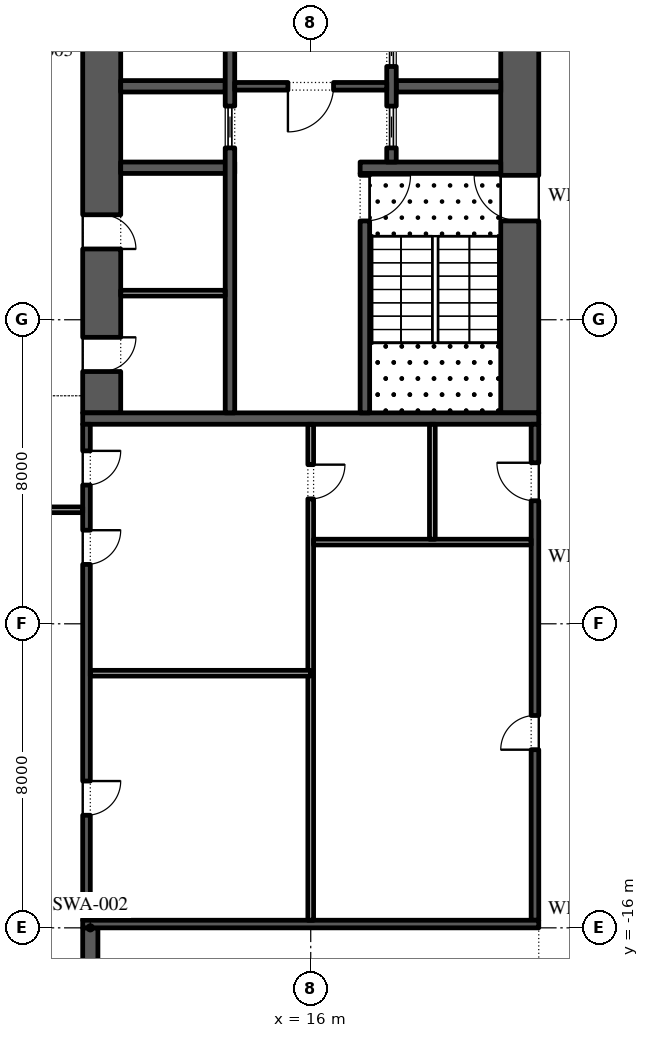
"""IFC4 building model, lengths in metres.
Left out: names, types, materials, properties, quantities, classifications, styles, units other than length and angle.
Written with IfcOpenShell. Run it as: python <this file> out.ifc"""

import sys

from ifc_helpers import new_model, si_unit, direction, frame, frame_2d, origin, place, context, subcontext, project, spatial, rectangle, extrude, element, fill, save


model = new_model("IFC4")
c1 = context("Model", 3, precision=1e-05, world=origin(), true_north=direction((0.0, 1.0)))
c2 = subcontext(c1, "Body", "Model", "MODEL_VIEW")
j1 = project(units=[si_unit("LENGTHUNIT", "METRE"), si_unit("PLANEANGLEUNIT", "RADIAN")], contexts=[c1])
p1 = place(None, origin())
s1 = spatial("IfcSite", under=j1, at=p1, CompositionType="ELEMENT")
p2 = place(p1, origin())
s2 = spatial("IfcBuilding", under=s1, at=p2, CompositionType="ELEMENT")
p3 = place(p2, frame((0.0, 0.0, 14.0)))
s3 = spatial("IfcBuildingStorey", under=s2, at=p3, CompositionType="ELEMENT", Elevation=14.0)
p4 = place(p3, frame((10.2, -31.0, 0.0), z_axis=(0.0, 0.0, 1.0), x_axis=(0.0, 1.0, 0.0)))
e1 = element("IfcWall", 1, at=p4, inside=s3, PredefinedType="SHEAR", context=c2, shape_type="SweptSolid", body=[
    extrude(rectangle(XDim=15.0, YDim=0.4, at=frame_2d((7.5, 0.0))), origin(), (0.0, 0.0, 1.0), 4.9),
])
p5 = place(p3, frame((21.5, -2.45, 0.0), z_axis=(0.0, 0.0, 1.0), x_axis=(0.0, 1.0, 0.0)))
e2 = element("IfcWall", 2, at=p5, inside=s3, PredefinedType="SHEAR", context=c2, shape_type="SweptSolid", body=[
    extrude(rectangle(XDim=27.9, YDim=1.0, at=frame_2d((13.95, 0.0))), origin(), (0.0, 0.0, 1.0), 4.9),
])
p6 = place(p5, frame((5.05, 0.0, 0.0)))
e3 = element("IfcOpeningElement", 3, at=p6, cuts=e2, PredefinedType="OPENING", context=c2, shape_type="SweptSolid", body=[
    extrude(rectangle(XDim=1.2, YDim=2.1, at=frame_2d((0.6, 1.05))), frame((0.0, 0.51, 0.0), z_axis=(0.0, -1.0, 0.0), x_axis=(1.0, 0.0, 0.0)), (0.0, 0.0, 1.0), 1.02),
])
p7 = place(p5, frame((21.65, 0.0, 0.0)))
e4 = element("IfcOpeningElement", 4, at=p7, cuts=e2, PredefinedType="OPENING", context=c2, shape_type="SweptSolid", body=[
    extrude(rectangle(XDim=1.2, YDim=2.1, at=frame_2d((0.6, 1.05))), frame((0.0, 0.51, 0.0), z_axis=(0.0, -1.0, 0.0), x_axis=(1.0, 0.0, 0.0)), (0.0, 0.0, 1.0), 1.02),
])
p8 = place(p3, frame((10.5, -2.45, 0.0), z_axis=(0.0, 0.0, 1.0), x_axis=(0.0, 1.0, 0.0)))
e5 = element("IfcWall", 5, at=p8, inside=s3, PredefinedType="SHEAR", context=c2, shape_type="SweptSolid", body=[
    extrude(rectangle(XDim=27.9, YDim=1.0, at=frame_2d((13.95, 0.0))), origin(), (0.0, 0.0, 1.0), 4.9),
])
p9 = place(p8, frame((23.65, 0.0, 0.0)))
e6 = element("IfcOpeningElement", 6, at=p9, cuts=e5, PredefinedType="OPENING", context=c2, shape_type="SweptSolid", body=[
    extrude(rectangle(XDim=2.4, YDim=2.1, at=frame_2d((1.2, 1.05))), frame((0.0, 0.51, 0.0), z_axis=(0.0, -1.0, 0.0), x_axis=(1.0, 0.0, 0.0)), (0.0, 0.0, 1.0), 1.02),
])
p10 = place(p8, frame((1.087, 0.0, 0.0)))
e7 = element("IfcOpeningElement", 7, at=p10, cuts=e5, PredefinedType="OPENING", context=c2, shape_type="SweptSolid", body=[
    extrude(rectangle(XDim=0.9, YDim=2.1, at=frame_2d((0.45, 1.05))), frame((0.0, 0.51, 0.0), z_axis=(0.0, -1.0, 0.0), x_axis=(1.0, 0.0, 0.0)), (0.0, 0.0, 1.0), 1.02),
])
p11 = place(p8, frame((4.312, 0.0, 0.0)))
e8 = element("IfcOpeningElement", 8, at=p11, cuts=e5, PredefinedType="OPENING", context=c2, shape_type="SweptSolid", body=[
    extrude(rectangle(XDim=0.9, YDim=2.1, at=frame_2d((0.45, 1.05))), frame((0.0, 0.51, 0.0), z_axis=(0.0, -1.0, 0.0), x_axis=(1.0, 0.0, 0.0)), (0.0, 0.0, 1.0), 1.02),
])
p12 = place(p3, frame((10.0, -2.6, 0.0), z_axis=(0.0, 0.0, 1.0), x_axis=(1.0, 0.0, 0.0)))
e9 = element("IfcWall", 9, at=p12, inside=s3, PredefinedType="SHEAR", context=c2, shape_type="SweptSolid", body=[
    extrude(rectangle(XDim=12.0, YDim=0.3, at=frame_2d((6.0, 0.0))), origin(), (0.0, 0.0, 1.0), 4.9),
])
p13 = place(p3, frame((17.3, 4.0, 0.0), z_axis=(0.0, 0.0, 1.0), x_axis=(1.0, 0.0, 0.0)))
e10 = element("IfcWall", 10, at=p13, inside=s3, PredefinedType="SHEAR", context=c2, shape_type="SweptSolid", body=[
    extrude(rectangle(XDim=3.7, YDim=0.3, at=frame_2d((1.85, 0.0))), origin(), (0.0, 0.0, 1.0), 4.9),
])
p14 = place(p3, frame((17.425, -2.45, 0.0), z_axis=(0.0, 0.0, 1.0), x_axis=(0.0, 1.0, 0.0)))
e11 = element("IfcWall", 11, at=p14, inside=s3, PredefinedType="SHEAR", context=c2, shape_type="SweptSolid", body=[
    extrude(rectangle(XDim=6.3, YDim=0.25, at=frame_2d((3.15, 0.0))), origin(), (0.0, 0.0, 1.0), 4.9),
])
p15 = place(p14, frame((5.05, 0.0, 0.0)))
e12 = element("IfcOpeningElement", 12, at=p15, cuts=e11, PredefinedType="OPENING", context=c2, shape_type="SweptSolid", body=[
    extrude(rectangle(XDim=1.2, YDim=2.1, at=frame_2d((0.6, 1.05))), frame((0.0, 0.135, 0.0), z_axis=(0.0, -1.0, 0.0), x_axis=(1.0, 0.0, 0.0)), (0.0, 0.0, 1.0), 0.27),
])
p16 = place(p3, frame((18.25, 6.143, 0.0), z_axis=(0.0, 0.0, 1.0), x_axis=(1.0, 0.0, 0.0)))
e13 = element("IfcWall", 13, at=p16, inside=s3, PredefinedType="SHEAR", context=c2, shape_type="SweptSolid", body=[
    extrude(rectangle(XDim=2.75, YDim=0.3, at=frame_2d((1.375, 0.0))), origin(), (0.0, 0.0, 1.0), 4.9),
])
p17 = place(p3, frame((18.125, 4.15, 0.0), z_axis=(0.0, 0.0, 1.0), x_axis=(0.0, 1.0, 0.0)))
e14 = element("IfcWall", 14, at=p17, inside=s3, PredefinedType="SHEAR", context=c2, shape_type="SweptSolid", body=[
    extrude(rectangle(XDim=14.7, YDim=0.25, at=frame_2d((7.35, 0.0))), origin(), (0.0, 0.0, 1.0), 4.9),
])
p18 = place(p17, frame((0.371, 0.0, 0.0)))
e15 = element("IfcOpeningElement", 15, at=p18, cuts=e14, PredefinedType="OPENING", context=c2, shape_type="SweptSolid", body=[
    extrude(rectangle(XDim=1.1, YDim=2.1, at=frame_2d((0.55, 1.05))), frame((0.0, 0.135, 0.0), z_axis=(0.0, -1.0, 0.0), x_axis=(1.0, 0.0, 0.0)), (0.0, 0.0, 1.0), 0.27),
])
p19 = place(p17, frame((2.514, 0.0, 0.0)))
e16 = element("IfcOpeningElement", 16, at=p19, cuts=e14, PredefinedType="OPENING", context=c2, shape_type="SweptSolid", body=[
    extrude(rectangle(XDim=1.1, YDim=2.1, at=frame_2d((0.55, 1.05))), frame((0.0, 0.135, 0.0), z_axis=(0.0, -1.0, 0.0), x_axis=(1.0, 0.0, 0.0)), (0.0, 0.0, 1.0), 0.27),
])
p20 = place(p17, frame((4.657, 0.0, 0.0)))
e17 = element("IfcOpeningElement", 17, at=p20, cuts=e14, PredefinedType="OPENING", context=c2, shape_type="SweptSolid", body=[
    extrude(rectangle(XDim=1.1, YDim=2.1, at=frame_2d((0.55, 1.05))), frame((0.0, 0.135, 0.0), z_axis=(0.0, -1.0, 0.0), x_axis=(1.0, 0.0, 0.0)), (0.0, 0.0, 1.0), 0.27),
])
p21 = place(p17, frame((6.8, 0.0, 0.0)))
e18 = element("IfcOpeningElement", 18, at=p21, cuts=e14, PredefinedType="OPENING", context=c2, shape_type="SweptSolid", body=[
    extrude(rectangle(XDim=1.1, YDim=2.1, at=frame_2d((0.55, 1.05))), frame((0.0, 0.135, 0.0), z_axis=(0.0, -1.0, 0.0), x_axis=(1.0, 0.0, 0.0)), (0.0, 0.0, 1.0), 0.27),
])
p22 = place(p17, frame((8.943, 0.0, 0.0)))
e19 = element("IfcOpeningElement", 19, at=p22, cuts=e14, PredefinedType="OPENING", context=c2, shape_type="SweptSolid", body=[
    extrude(rectangle(XDim=1.1, YDim=2.1, at=frame_2d((0.55, 1.05))), frame((0.0, 0.135, 0.0), z_axis=(0.0, -1.0, 0.0), x_axis=(1.0, 0.0, 0.0)), (0.0, 0.0, 1.0), 0.27),
])
p23 = place(p17, frame((11.086, 0.0, 0.0)))
e20 = element("IfcOpeningElement", 20, at=p23, cuts=e14, PredefinedType="OPENING", context=c2, shape_type="SweptSolid", body=[
    extrude(rectangle(XDim=1.1, YDim=2.1, at=frame_2d((0.55, 1.05))), frame((0.0, 0.135, 0.0), z_axis=(0.0, -1.0, 0.0), x_axis=(1.0, 0.0, 0.0)), (0.0, 0.0, 1.0), 0.27),
])
p24 = place(p17, frame((13.229, 0.0, 0.0)))
e21 = element("IfcOpeningElement", 21, at=p24, cuts=e14, PredefinedType="OPENING", context=c2, shape_type="SweptSolid", body=[
    extrude(rectangle(XDim=1.1, YDim=2.1, at=frame_2d((0.55, 1.05))), frame((0.0, 0.135, 0.0), z_axis=(0.0, -1.0, 0.0), x_axis=(1.0, 0.0, 0.0)), (0.0, 0.0, 1.0), 0.27),
])
p25 = place(p3, frame((11.0, 4.0, 0.0), z_axis=(0.0, 0.0, 1.0), x_axis=(1.0, 0.0, 0.0)))
e22 = element("IfcWall", 22, at=p25, inside=s3, PredefinedType="SHEAR", context=c2, shape_type="SweptSolid", body=[
    extrude(rectangle(XDim=3.0, YDim=0.3, at=frame_2d((1.5, 0.0))), origin(), (0.0, 0.0, 1.0), 4.9),
])
p26 = place(p3, frame((11.0, 6.143, 0.0), z_axis=(0.0, 0.0, 1.0), x_axis=(1.0, 0.0, 0.0)))
e23 = element("IfcWall", 23, at=p26, inside=s3, PredefinedType="SHEAR", context=c2, shape_type="SweptSolid", body=[
    extrude(rectangle(XDim=2.75, YDim=0.3, at=frame_2d((1.375, 0.0))), origin(), (0.0, 0.0, 1.0), 4.9),
])
p27 = place(p3, frame((13.875, -2.45, 0.0), z_axis=(0.0, 0.0, 1.0), x_axis=(0.0, 1.0, 0.0)))
e24 = element("IfcWall", 24, at=p27, inside=s3, PredefinedType="SHEAR", context=c2, shape_type="SweptSolid", body=[
    extrude(rectangle(XDim=21.3, YDim=0.25, at=frame_2d((10.65, 0.0))), origin(), (0.0, 0.0, 1.0), 4.9),
])
p28 = place(p27, frame((14.571, 0.0, 0.0)))
e25 = element("IfcOpeningElement", 25, at=p28, cuts=e24, PredefinedType="OPENING", context=c2, shape_type="SweptSolid", body=[
    extrude(rectangle(XDim=0.9, YDim=2.1, at=frame_2d((0.45, 1.05))), frame((0.0, 0.135, 0.0), z_axis=(0.0, -1.0, 0.0), x_axis=(1.0, 0.0, 0.0)), (0.0, 0.0, 1.0), 0.27),
])
p29 = place(p27, frame((6.971, 0.0, 0.0)))
e26 = element("IfcOpeningElement", 26, at=p29, cuts=e24, PredefinedType="OPENING", context=c2, shape_type="SweptSolid", body=[
    extrude(rectangle(XDim=1.1, YDim=2.1, at=frame_2d((0.55, 1.05))), frame((0.0, 0.135, 0.0), z_axis=(0.0, -1.0, 0.0), x_axis=(1.0, 0.0, 0.0)), (0.0, 0.0, 1.0), 0.27),
])
p30 = place(p3, frame((14.0, 6.143, 0.0), z_axis=(0.0, 0.0, 1.0), x_axis=(1.0, 0.0, 0.0)))
e27 = element("IfcWall", 27, at=p30, inside=s3, PredefinedType="SHEAR", context=c2, shape_type="SweptSolid", body=[
    extrude(rectangle(XDim=4.0, YDim=0.2, at=frame_2d((2.0, 0.0))), origin(), (0.0, 0.0, 1.0), 4.9),
])
p31 = place(p30, frame((1.4, 0.0, 0.0)))
e28 = element("IfcOpeningElement", 28, at=p31, cuts=e27, PredefinedType="OPENING", context=c2, shape_type="SweptSolid", body=[
    extrude(rectangle(XDim=1.2, YDim=2.1, at=frame_2d((0.6, 1.05))), frame((0.0, 0.11, 0.0), z_axis=(0.0, -1.0, 0.0), x_axis=(1.0, 0.0, 0.0)), (0.0, 0.0, 1.0), 0.22),
])
p32 = place(p3, frame((11.0, 0.7, 0.0), z_axis=(0.0, 0.0, 1.0), x_axis=(1.0, 0.0, 0.0)))
e29 = element("IfcWall", 29, at=p32, inside=s3, PredefinedType="PARTITIONING", context=c2, shape_type="SweptSolid", body=[
    extrude(rectangle(XDim=2.75, YDim=0.15, at=frame_2d((1.375, 0.0))), origin(), (0.0, 0.0, 1.0), 4.9),
])
p33 = place(p3, frame((21.9, -15.8, 0.0), z_axis=(0.0, 0.0, 1.0), x_axis=(0.0, 1.0, 0.0)))
e30 = element("IfcWall", 30, at=p33, inside=s3, PredefinedType="SHEAR", context=c2, shape_type="SweptSolid", body=[
    extrude(rectangle(XDim=13.05, YDim=0.2, at=frame_2d((6.525, 0.0))), origin(), (0.0, 0.0, 1.0), 4.9),
])
p34 = place(p33, frame((4.488, 0.0, 0.0)))
e31 = element("IfcOpeningElement", 31, at=p34, cuts=e30, PredefinedType="OPENING", context=c2, shape_type="SweptSolid", body=[
    extrude(rectangle(XDim=0.9, YDim=2.1, at=frame_2d((0.45, 1.05))), frame((0.0, 0.11, 0.0), z_axis=(0.0, -1.0, 0.0), x_axis=(1.0, 0.0, 0.0)), (0.0, 0.0, 1.0), 0.22),
])
p35 = place(p33, frame((11.038, 0.0, 0.0)))
e32 = element("IfcOpeningElement", 32, at=p35, cuts=e30, PredefinedType="OPENING", context=c2, shape_type="SweptSolid", body=[
    extrude(rectangle(XDim=1.0, YDim=2.1, at=frame_2d((0.5, 1.05))), frame((0.0, 0.11, 0.0), z_axis=(0.0, -1.0, 0.0), x_axis=(1.0, 0.0, 0.0)), (0.0, 0.0, 1.0), 0.22),
])
p36 = place(p3, frame((10.1, -15.8, 0.0), z_axis=(0.0, 0.0, 1.0), x_axis=(0.0, 1.0, 0.0)))
e33 = element("IfcWall", 33, at=p36, inside=s3, PredefinedType="SHEAR", context=c2, shape_type="SweptSolid", body=[
    extrude(rectangle(XDim=13.05, YDim=0.2, at=frame_2d((6.525, 0.0))), origin(), (0.0, 0.0, 1.0), 4.9),
])
p37 = place(p36, frame((2.762, 0.0, 0.0)))
e34 = element("IfcOpeningElement", 34, at=p37, cuts=e33, PredefinedType="OPENING", context=c2, shape_type="SweptSolid", body=[
    extrude(rectangle(XDim=0.9, YDim=2.1, at=frame_2d((0.45, 1.05))), frame((0.0, 0.11, 0.0), z_axis=(0.0, -1.0, 0.0), x_axis=(1.0, 0.0, 0.0)), (0.0, 0.0, 1.0), 0.22),
])
p38 = place(p36, frame((9.363, 0.0, 0.0)))
e35 = element("IfcOpeningElement", 35, at=p38, cuts=e33, PredefinedType="OPENING", context=c2, shape_type="SweptSolid", body=[
    extrude(rectangle(XDim=0.9, YDim=2.1, at=frame_2d((0.45, 1.05))), frame((0.0, 0.11, 0.0), z_axis=(0.0, -1.0, 0.0), x_axis=(1.0, 0.0, 0.0)), (0.0, 0.0, 1.0), 0.22),
])
p39 = place(p36, frame((11.45, 0.0, 0.0)))
e36 = element("IfcOpeningElement", 36, at=p39, cuts=e33, PredefinedType="OPENING", context=c2, shape_type="SweptSolid", body=[
    extrude(rectangle(XDim=0.9, YDim=2.1, at=frame_2d((0.45, 1.05))), frame((0.0, 0.11, 0.0), z_axis=(0.0, -1.0, 0.0), x_axis=(1.0, 0.0, 0.0)), (0.0, 0.0, 1.0), 0.22),
])
p40 = place(p3, frame((10.0, -15.9, 0.0), z_axis=(0.0, 0.0, 1.0), x_axis=(1.0, 0.0, 0.0)))
e37 = element("IfcWall", 37, at=p40, inside=s3, PredefinedType="SHEAR", context=c2, shape_type="SweptSolid", body=[
    extrude(rectangle(XDim=12.0, YDim=0.2, at=frame_2d((6.0, 0.0))), origin(), (0.0, 0.0, 1.0), 4.9),
])
p41 = place(p3, frame((16.0, -15.8, 0.0), z_axis=(0.0, 0.0, 1.0), x_axis=(0.0, 1.0, 0.0)))
e38 = element("IfcWall", 38, at=p41, inside=s3, PredefinedType="PARTITIONING", context=c2, shape_type="SweptSolid", body=[
    extrude(rectangle(XDim=13.05, YDim=0.15, at=frame_2d((6.525, 0.0))), origin(), (0.0, 0.0, 1.0), 4.9),
])
p42 = place(p41, frame((11.087, 0.0, 0.0)))
e39 = element("IfcOpeningElement", 39, at=p42, cuts=e38, PredefinedType="OPENING", context=c2, shape_type="SweptSolid", body=[
    extrude(rectangle(XDim=0.9, YDim=2.1, at=frame_2d((0.45, 1.05))), frame((0.0, 0.085, 0.0), z_axis=(0.0, -1.0, 0.0), x_axis=(1.0, 0.0, 0.0)), (0.0, 0.0, 1.0), 0.17),
])
p43 = place(p3, frame((10.2, -9.3, 0.0), z_axis=(0.0, 0.0, 1.0), x_axis=(1.0, 0.0, 0.0)))
e40 = element("IfcWall", 40, at=p43, inside=s3, PredefinedType="PARTITIONING", context=c2, shape_type="SweptSolid", body=[
    extrude(rectangle(XDim=5.8, YDim=0.15, at=frame_2d((2.9, 0.0))), origin(), (0.0, 0.0, 1.0), 4.9),
])
p44 = place(p3, frame((16.075, -5.85, 0.0), z_axis=(0.0, 0.0, 1.0), x_axis=(1.0, 0.0, 0.0)))
e41 = element("IfcWall", 41, at=p44, inside=s3, PredefinedType="PARTITIONING", context=c2, shape_type="SweptSolid", body=[
    extrude(rectangle(XDim=5.725, YDim=0.15, at=frame_2d((2.863, 0.0))), origin(), (0.0, 0.0, 1.0), 4.9),
])
p45 = place(p3, frame((19.2, -5.775, 0.0), z_axis=(0.0, 0.0, 1.0), x_axis=(0.0, 1.0, 0.0)))
e42 = element("IfcWall", 42, at=p45, inside=s3, PredefinedType="PARTITIONING", context=c2, shape_type="SweptSolid", body=[
    extrude(rectangle(XDim=3.025, YDim=0.15, at=frame_2d((1.512, 0.0))), origin(), (0.0, 0.0, 1.0), 4.9),
])
p46 = place(p3, frame((2.075, -5.0, 0.0), z_axis=(0.0, 0.0, 1.0), x_axis=(1.0, 0.0, 0.0)))
e43 = element("IfcWall", 43, at=p46, inside=s3, PredefinedType="PARTITIONING", context=c2, shape_type="SweptSolid", body=[
    extrude(rectangle(XDim=7.925, YDim=0.15, at=frame_2d((3.962, 0.0))), origin(), (0.0, 0.0, 1.0), 4.9),
])
p47 = place(p18, origin())
e44 = element("IfcDoor", 44, at=p47, inside=s3, OperationType="SLIDING_TO_LEFT", PredefinedType="DOOR", context=c2, shape_type="SweptSolid", body=[
    extrude(rectangle(XDim=1.1, YDim=2.1, at=frame_2d((0.55, 1.05))), frame((0.0, 0.025, 0.0), z_axis=(0.0, -1.0, 0.0), x_axis=(1.0, 0.0, 0.0)), (0.0, 0.0, 1.0), 0.05),
])
fill(e15, e44)
p48 = place(p19, origin())
e45 = element("IfcDoor", 45, at=p48, inside=s3, OperationType="SLIDING_TO_LEFT", PredefinedType="DOOR", context=c2, shape_type="SweptSolid", body=[
    extrude(rectangle(XDim=1.1, YDim=2.1, at=frame_2d((0.55, 1.05))), frame((0.0, 0.025, 0.0), z_axis=(0.0, -1.0, 0.0), x_axis=(1.0, 0.0, 0.0)), (0.0, 0.0, 1.0), 0.05),
])
fill(e16, e45)
p49 = place(p29, origin())
e46 = element("IfcDoor", 46, at=p49, inside=s3, OperationType="SLIDING_TO_LEFT", PredefinedType="DOOR", context=c2, shape_type="SweptSolid", body=[
    extrude(rectangle(XDim=1.1, YDim=2.1, at=frame_2d((0.55, 1.05))), frame((0.0, 0.025, 0.0), z_axis=(0.0, -1.0, 0.0), x_axis=(1.0, 0.0, 0.0)), (0.0, 0.0, 1.0), 0.05),
])
fill(e26, e46)
p50 = place(p31, frame((1.2, 0.0, 0.0), z_axis=(0.0, 0.0, 1.0), x_axis=(-1.0, 0.0, 0.0)))
e47 = element("IfcDoor", 47, at=p50, inside=s3, OperationType="SINGLE_SWING_LEFT", PredefinedType="DOOR", context=c2, shape_type="SweptSolid", body=[
    extrude(rectangle(XDim=1.2, YDim=2.1, at=frame_2d((0.6, 1.05))), frame((0.0, 0.025, 0.0), z_axis=(0.0, -1.0, 0.0), x_axis=(1.0, 0.0, 0.0)), (0.0, 0.0, 1.0), 0.05),
])
fill(e28, e47)
p51 = place(p15, frame((1.2, 0.0, 0.0), z_axis=(0.0, 0.0, 1.0), x_axis=(-1.0, 0.0, 0.0)))
e48 = element("IfcDoor", 48, at=p51, inside=s3, OperationType="SINGLE_SWING_RIGHT", PredefinedType="DOOR", context=c2, shape_type="SweptSolid", body=[
    extrude(rectangle(XDim=1.2, YDim=2.1, at=frame_2d((0.6, 1.05))), frame((0.0, 0.025, 0.0), z_axis=(0.0, -1.0, 0.0), x_axis=(1.0, 0.0, 0.0)), (0.0, 0.0, 1.0), 0.05),
])
fill(e12, e48)
p52 = place(p6, origin())
e49 = element("IfcDoor", 49, at=p52, inside=s3, OperationType="SINGLE_SWING_LEFT", PredefinedType="DOOR", context=c2, shape_type="SweptSolid", body=[
    extrude(rectangle(XDim=1.2, YDim=2.1, at=frame_2d((0.6, 1.05))), frame((0.0, 0.025, 0.0), z_axis=(0.0, -1.0, 0.0), x_axis=(1.0, 0.0, 0.0)), (0.0, 0.0, 1.0), 0.05),
])
fill(e3, e49)
p53 = place(p10, frame((0.9, -0.95, 0.0), z_axis=(0.0, 0.0, 1.0), x_axis=(-1.0, 0.0, 0.0)))
e50 = element("IfcDoor", 50, at=p53, inside=s3, OperationType="SINGLE_SWING_RIGHT", PredefinedType="DOOR", context=c2, shape_type="SweptSolid", body=[
    extrude(rectangle(XDim=0.9, YDim=2.1, at=frame_2d((0.45, 1.05))), frame((0.0, -0.45, 0.0), z_axis=(0.0, -1.0, 0.0), x_axis=(1.0, 0.0, 0.0)), (0.0, 0.0, 1.0), 0.05),
])
fill(e7, e50)
p54 = place(p11, frame((0.9, -0.95, 0.0), z_axis=(0.0, 0.0, 1.0), x_axis=(-1.0, 0.0, 0.0)))
e51 = element("IfcDoor", 51, at=p54, inside=s3, OperationType="SINGLE_SWING_LEFT", PredefinedType="DOOR", context=c2, shape_type="SweptSolid", body=[
    extrude(rectangle(XDim=0.9, YDim=2.1, at=frame_2d((0.45, 1.05))), frame((0.0, -0.45, 0.0), z_axis=(0.0, -1.0, 0.0), x_axis=(1.0, 0.0, 0.0)), (0.0, 0.0, 1.0), 0.05),
])
fill(e8, e51)
p55 = place(p34, origin())
e52 = element("IfcDoor", 52, at=p55, inside=s3, OperationType="SINGLE_SWING_RIGHT", PredefinedType="DOOR", context=c2, shape_type="SweptSolid", body=[
    extrude(rectangle(XDim=0.9, YDim=2.1, at=frame_2d((0.45, 1.05))), frame((0.0, 0.1, 0.0), z_axis=(0.0, -1.0, 0.0), x_axis=(1.0, 0.0, 0.0)), (0.0, 0.0, 1.0), 0.05),
])
fill(e31, e52)
p56 = place(p35, origin())
e53 = element("IfcDoor", 53, at=p56, inside=s3, OperationType="SINGLE_SWING_LEFT", PredefinedType="DOOR", context=c2, shape_type="SweptSolid", body=[
    extrude(rectangle(XDim=1.0, YDim=2.1, at=frame_2d((0.5, 1.05))), frame((0.0, 0.1, 0.0), z_axis=(0.0, -1.0, 0.0), x_axis=(1.0, 0.0, 0.0)), (0.0, 0.0, 1.0), 0.05),
])
fill(e32, e53)
p57 = place(p42, frame((0.9, 0.0, 0.0), z_axis=(0.0, 0.0, 1.0), x_axis=(-1.0, 0.0, 0.0)))
e54 = element("IfcDoor", 54, at=p57, inside=s3, OperationType="SINGLE_SWING_RIGHT", PredefinedType="DOOR", context=c2, shape_type="SweptSolid", body=[
    extrude(rectangle(XDim=0.9, YDim=2.1, at=frame_2d((0.45, 1.05))), frame((0.0, 0.025, 0.0), z_axis=(0.0, -1.0, 0.0), x_axis=(1.0, 0.0, 0.0)), (0.0, 0.0, 1.0), 0.05),
])
fill(e39, e54)
p58 = place(p37, frame((0.9, -0.15, 0.0), z_axis=(0.0, 0.0, 1.0), x_axis=(-1.0, 0.0, 0.0)))
e55 = element("IfcDoor", 55, at=p58, inside=s3, OperationType="SINGLE_SWING_RIGHT", PredefinedType="DOOR", context=c2, shape_type="SweptSolid", body=[
    extrude(rectangle(XDim=0.9, YDim=2.1, at=frame_2d((0.45, 1.05))), frame((0.0, -0.05, 0.0), z_axis=(0.0, -1.0, 0.0), x_axis=(1.0, 0.0, 0.0)), (0.0, 0.0, 1.0), 0.05),
])
fill(e34, e55)
p59 = place(p38, frame((0.9, -0.15, 0.0), z_axis=(0.0, 0.0, 1.0), x_axis=(-1.0, 0.0, 0.0)))
e56 = element("IfcDoor", 56, at=p59, inside=s3, OperationType="SINGLE_SWING_RIGHT", PredefinedType="DOOR", context=c2, shape_type="SweptSolid", body=[
    extrude(rectangle(XDim=0.9, YDim=2.1, at=frame_2d((0.45, 1.05))), frame((0.0, -0.05, 0.0), z_axis=(0.0, -1.0, 0.0), x_axis=(1.0, 0.0, 0.0)), (0.0, 0.0, 1.0), 0.05),
])
fill(e35, e56)
p60 = place(p39, frame((0.9, -0.15, 0.0), z_axis=(0.0, 0.0, 1.0), x_axis=(-1.0, 0.0, 0.0)))
e57 = element("IfcDoor", 57, at=p60, inside=s3, OperationType="SINGLE_SWING_RIGHT", PredefinedType="DOOR", context=c2, shape_type="SweptSolid", body=[
    extrude(rectangle(XDim=0.9, YDim=2.1, at=frame_2d((0.45, 1.05))), frame((0.0, -0.05, 0.0), z_axis=(0.0, -1.0, 0.0), x_axis=(1.0, 0.0, 0.0)), (0.0, 0.0, 1.0), 0.05),
])
fill(e36, e57)
save(model, sys.argv[1])
